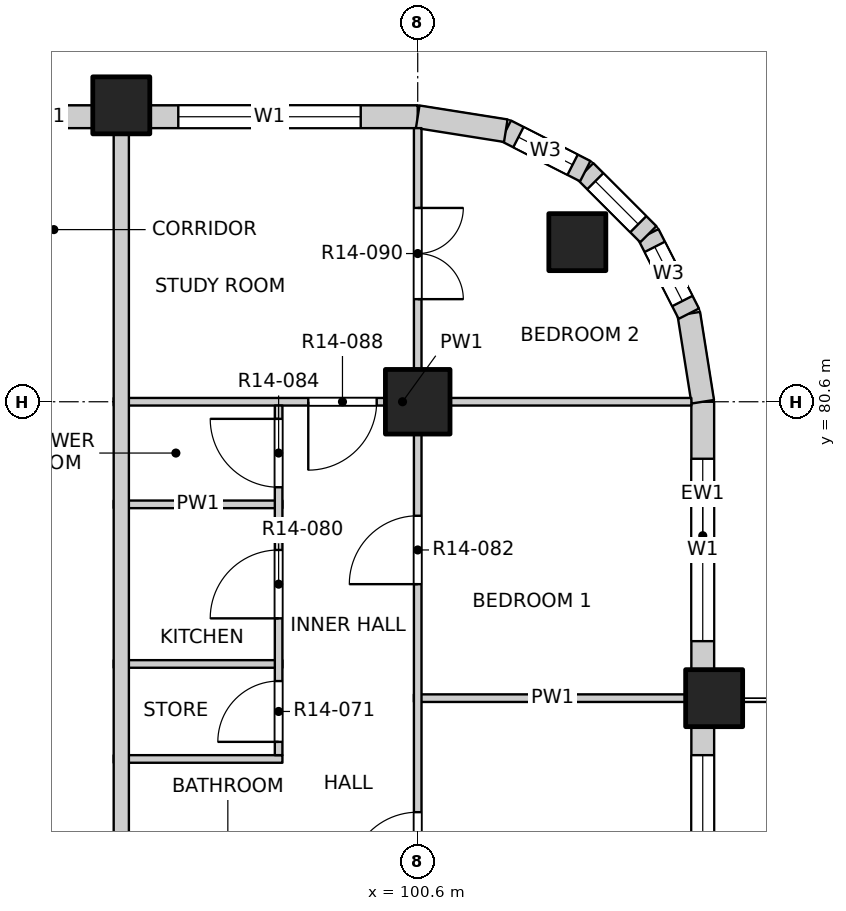
"""IFC4 building model, lengths in metres.
Left out: names, types, materials, properties, quantities, classifications, styles, units other than length and angle.
Written with IfcOpenShell. Run it as: python <this file> out.ifc"""

import sys

from ifc_helpers import new_model, si_unit, direction, frame, frame_2d, origin, origin_2d, place, context, subcontext, project, spatial, rectangle, extrude, element, fill, save


model = new_model("IFC4")
c1 = context("Model", 3, precision=1e-05, world=origin(), true_north=direction((0.0, 1.0)))
c2 = subcontext(c1, "Body", "Model", "MODEL_VIEW")
j1 = project(units=[si_unit("LENGTHUNIT", "METRE"), si_unit("PLANEANGLEUNIT", "RADIAN")], contexts=[c1])
p1 = place(None, origin())
s1 = spatial("IfcSite", under=j1, at=p1, CompositionType="ELEMENT")
p2 = place(p1, origin())
s2 = spatial("IfcBuilding", under=s1, at=p2, CompositionType="ELEMENT")
p3 = place(p2, frame((0.0, 0.0, 148.6)))
s3 = spatial("IfcBuildingStorey", under=s2, at=p3, CompositionType="ELEMENT", Elevation=148.6)
for number, where, z_axis, x_axis in (
    (1, (102.7, 82.7, -0.3), (0.0, 0.0, 1.0), (1.0, 0.0, 0.0)),
    (2, (104.5, 76.7, -0.3), (0.0, 0.0, 1.0), (1.0, 0.0, 0.0)),
    (3, (96.7, 84.5, -0.3), (0.0, 0.0, 1.0), (1.0, 0.0, 0.0)),
):
    element("IfcColumn", number, at=place(p3, frame(where, z_axis=z_axis, x_axis=x_axis)), inside=s3, PredefinedType="COLUMN", context=c2, shape_type="SweptSolid", body=[
        extrude(rectangle(XDim=0.75, YDim=0.75, at=origin_2d()), origin(), (0.0, 0.0, 1.0), 3.45),
    ])
p4 = place(p3, frame((100.6, 80.6, -0.3), z_axis=(0.0, 0.0, 1.0), x_axis=(1.0, 0.0, 0.0)))
e4 = element("IfcColumn", 4, at=p4, inside=s3, PredefinedType="COLUMN", context=c2, shape_type="SweptSolid", body=[
    extrude(rectangle(XDim=0.85, YDim=0.85, at=origin_2d()), origin(), (0.0, 0.0, 1.0), 3.45),
])
p5 = place(p3, frame((104.35, 69.275, 0.0), z_axis=(0.0, 0.0, 1.0), x_axis=(0.0, 1.0, 0.0)))
e5 = element("IfcWall", 5, at=p5, inside=s3, PredefinedType="SOLIDWALL", context=c2, shape_type="SweptSolid", body=[
    extrude(rectangle(XDim=7.05, YDim=0.3, at=frame_2d((3.525, 0.0))), origin(), (0.0, 0.0, 1.0), 2.7),
])
p6 = place(p5, frame((0.675, 0.0, 0.0)))
e6 = element("IfcOpeningElement", 6, at=p6, cuts=e5, PredefinedType="OPENING", context=c2, shape_type="SweptSolid", body=[
    extrude(rectangle(XDim=1.8, YDim=2.4, at=frame_2d((0.9, 1.2))), frame((0.0, 0.16, 0.0), z_axis=(0.0, -1.0, 0.0), x_axis=(1.0, 0.0, 0.0)), (0.0, 0.0, 1.0), 0.32),
])
p7 = place(p5, frame((4.275, 0.0, 0.9)))
e7 = element("IfcOpeningElement", 7, at=p7, cuts=e5, PredefinedType="OPENING", context=c2, shape_type="SweptSolid", body=[
    extrude(rectangle(XDim=2.4, YDim=1.8, at=frame_2d((1.2, 0.9))), frame((0.0, 0.16, 0.0), z_axis=(0.0, -1.0, 0.0), x_axis=(1.0, 0.0, 0.0)), (0.0, 0.0, 1.0), 0.32),
])
p8 = place(p3, frame((104.35, 77.075, 0.0), z_axis=(0.0, 0.0, 1.0), x_axis=(0.0, 1.0, 0.0)))
e8 = element("IfcWall", 8, at=p8, inside=s3, PredefinedType="SOLIDWALL", context=c2, shape_type="SweptSolid", body=[
    extrude(rectangle(XDim=3.525, YDim=0.3, at=frame_2d((1.763, 0.0))), origin(), (0.0, 0.0, 1.0), 2.7),
])
p9 = place(p8, frame((0.375, 0.0, 0.9)))
e9 = element("IfcOpeningElement", 9, at=p9, cuts=e8, PredefinedType="OPENING", context=c2, shape_type="SweptSolid", body=[
    extrude(rectangle(XDim=2.4, YDim=1.8, at=frame_2d((1.2, 0.9))), frame((0.0, 0.16, 0.0), z_axis=(0.0, -1.0, 0.0), x_axis=(1.0, 0.0, 0.0)), (0.0, 0.0, 1.0), 0.32),
])
p10 = place(p3, frame((95.025, 84.35, 0.0), z_axis=(0.0, 0.0, 1.0), x_axis=(1.0, 0.0, 0.0)))
e10 = element("IfcWall", 10, at=p10, inside=s3, PredefinedType="SOLIDWALL", context=c2, shape_type="SweptSolid", body=[
    extrude(rectangle(XDim=1.3, YDim=0.3, at=frame_2d((0.65, 0.0))), origin(), (0.0, 0.0, 1.0), 2.7),
])
p11 = place(p3, frame((97.075, 84.35, 0.0), z_axis=(0.0, 0.0, 1.0), x_axis=(1.0, 0.0, 0.0)))
e11 = element("IfcWall", 11, at=p11, inside=s3, PredefinedType="SOLIDWALL", context=c2, shape_type="SweptSolid", body=[
    extrude(rectangle(XDim=3.525, YDim=0.3, at=frame_2d((1.763, 0.0))), origin(), (0.0, 0.0, 1.0), 2.7),
])
p12 = place(p11, frame((0.375, 0.0, 0.9)))
e12 = element("IfcOpeningElement", 12, at=p12, cuts=e11, PredefinedType="OPENING", context=c2, shape_type="SweptSolid", body=[
    extrude(rectangle(XDim=2.4, YDim=1.8, at=frame_2d((1.2, 0.9))), frame((0.0, 0.16, 0.0), z_axis=(0.0, -1.0, 0.0), x_axis=(1.0, 0.0, 0.0)), (0.0, 0.0, 1.0), 0.32),
])
p13 = place(p3, frame((104.35, 80.6, 0.0), z_axis=(0.0, 0.0, 1.0), x_axis=(-0.156496880861, 0.987678452879, 0.0)))
e13 = element("IfcWall", 13, at=p13, inside=s3, PredefinedType="SOLIDWALL", context=c2, shape_type="SweptSolid", body=[
    extrude(rectangle(XDim=1.173, YDim=0.3, at=frame_2d((0.586, 0.0))), origin(), (0.0, 0.0, 1.0), 2.7),
])
p14 = place(p3, frame((104.167, 81.759, 0.0), z_axis=(0.0, 0.0, 1.0), x_axis=(-0.454025524128, 0.890988677504, 0.0)))
e14 = element("IfcWall", 14, at=p14, inside=s3, PredefinedType="SOLIDWALL", context=c2, shape_type="SweptSolid", body=[
    extrude(rectangle(XDim=1.173, YDim=0.3, at=frame_2d((0.587, 0.0))), origin(), (0.0, 0.0, 1.0), 2.7),
])
p15 = place(p14, frame((0.187, 0.0, 0.9)))
e15 = element("IfcOpeningElement", 15, at=p15, cuts=e14, PredefinedType="OPENING", context=c2, shape_type="SweptSolid", body=[
    extrude(rectangle(XDim=0.8, YDim=1.2, at=frame_2d((0.4, 0.6))), frame((0.0, 0.16, 0.0), z_axis=(0.0, -1.0, 0.0), x_axis=(1.0, 0.0, 0.0)), (0.0, 0.0, 1.0), 0.32),
])
p16 = place(p3, frame((103.634, 82.804, 0.0), z_axis=(0.0, 0.0, 1.0), x_axis=(-0.707106781187, 0.707106781187, 0.0)))
e16 = element("IfcWall", 16, at=p16, inside=s3, PredefinedType="SOLIDWALL", context=c2, shape_type="SweptSolid", body=[
    extrude(rectangle(XDim=1.173, YDim=0.3, at=frame_2d((0.586, 0.0))), origin(), (0.0, 0.0, 1.0), 2.7),
])
p17 = place(p16, frame((0.187, 0.0, 0.9)))
e17 = element("IfcOpeningElement", 17, at=p17, cuts=e16, PredefinedType="OPENING", context=c2, shape_type="SweptSolid", body=[
    extrude(rectangle(XDim=0.8, YDim=1.2, at=frame_2d((0.4, 0.6))), frame((0.0, 0.16, 0.0), z_axis=(0.0, -1.0, 0.0), x_axis=(1.0, 0.0, 0.0)), (0.0, 0.0, 1.0), 0.32),
])
p18 = place(p3, frame((102.804, 83.634, 0.0), z_axis=(0.0, 0.0, 1.0), x_axis=(-0.890988677504, 0.454025524128, 0.0)))
e18 = element("IfcWall", 18, at=p18, inside=s3, PredefinedType="SOLIDWALL", context=c2, shape_type="SweptSolid", body=[
    extrude(rectangle(XDim=1.173, YDim=0.3, at=frame_2d((0.587, 0.0))), origin(), (0.0, 0.0, 1.0), 2.7),
])
p19 = place(p18, frame((0.187, 0.0, 0.9)))
e19 = element("IfcOpeningElement", 19, at=p19, cuts=e18, PredefinedType="OPENING", context=c2, shape_type="SweptSolid", body=[
    extrude(rectangle(XDim=0.8, YDim=1.2, at=frame_2d((0.4, 0.6))), frame((0.0, 0.16, 0.0), z_axis=(0.0, -1.0, 0.0), x_axis=(1.0, 0.0, 0.0)), (0.0, 0.0, 1.0), 0.32),
])
p20 = place(p3, frame((101.759, 84.167, 0.0), z_axis=(0.0, 0.0, 1.0), x_axis=(-0.987678452879, 0.156496880861, 0.0)))
e20 = element("IfcWall", 20, at=p20, inside=s3, PredefinedType="SOLIDWALL", context=c2, shape_type="SweptSolid", body=[
    extrude(rectangle(XDim=1.173, YDim=0.3, at=frame_2d((0.586, 0.0))), origin(), (0.0, 0.0, 1.0), 2.7),
])
p21 = place(p3, frame((96.6, 75.9, 0.0), z_axis=(0.0, 0.0, 1.0), x_axis=(1.0, 0.0, 0.0)))
e21 = element("IfcWall", 21, at=p21, inside=s3, PredefinedType="PARTITIONING", context=c2, shape_type="SweptSolid", body=[
    extrude(rectangle(XDim=2.22, YDim=0.1, at=frame_2d((1.11, 0.0))), origin(), (0.0, 0.0, 1.0), 3.15),
])
p22 = place(p3, frame((100.55, 76.7, 0.0), z_axis=(0.0, 0.0, 1.0), x_axis=(1.0, 0.0, 0.0)))
e22 = element("IfcWall", 22, at=p22, inside=s3, PredefinedType="PARTITIONING", context=c2, shape_type="SweptSolid", body=[
    extrude(rectangle(XDim=3.65, YDim=0.1, at=frame_2d((1.825, 0.0))), origin(), (0.0, 0.0, 1.0), 2.55),
])
for number, where, z_axis, x_axis in (
    (23, (96.6, 77.15, 0.0), (0.0, 0.0, 1.0), (1.0, 0.0, 0.0)),
    (24, (96.6, 79.25, 0.0), (0.0, 0.0, 1.0), (1.0, 0.0, 0.0)),
):
    element("IfcWall", number, at=place(p3, frame(where, z_axis=z_axis, x_axis=x_axis)), inside=s3, PredefinedType="PARTITIONING", context=c2, shape_type="SweptSolid", body=[
        extrude(rectangle(XDim=2.22, YDim=0.1, at=frame_2d((1.11, 0.0))), origin(), (0.0, 0.0, 1.0), 3.15),
    ])
p23 = place(p3, frame((96.6, 80.6, 0.0), z_axis=(0.0, 0.0, 1.0), x_axis=(1.0, 0.0, 0.0)))
e25 = element("IfcWall", 25, at=p23, inside=s3, PredefinedType="PARTITIONING", context=c2, shape_type="SweptSolid", body=[
    extrude(rectangle(XDim=7.6, YDim=0.1, at=frame_2d((3.8, 0.0))), origin(), (0.0, 0.0, 1.0), 3.15),
])
p24 = place(p23, frame((2.56, 0.0, 0.0)))
e26 = element("IfcOpeningElement", 26, at=p24, cuts=e25, PredefinedType="OPENING", context=c2, shape_type="SweptSolid", body=[
    extrude(rectangle(XDim=0.9, YDim=2.1, at=frame_2d((0.45, 1.05))), frame((0.0, 0.06, 0.0), z_axis=(0.0, -1.0, 0.0), x_axis=(1.0, 0.0, 0.0)), (0.0, 0.0, 1.0), 0.12),
])
p25 = place(p3, frame((96.7, 49.5, 0.0), z_axis=(0.0, 0.0, 1.0), x_axis=(0.0, 1.0, 0.0)))
e27 = element("IfcWall", 27, at=p25, inside=s3, PredefinedType="PARTITIONING", context=c2, shape_type="SweptSolid", body=[
    extrude(rectangle(XDim=34.7, YDim=0.2, at=frame_2d((17.35, 0.0))), origin(), (0.0, 0.0, 1.0), 3.15),
])
p26 = place(p25, frame((3.225, 0.0, 0.0)))
e28 = element("IfcOpeningElement", 28, at=p26, cuts=e27, PredefinedType="OPENING", context=c2, shape_type="SweptSolid", body=[
    extrude(rectangle(XDim=1.0, YDim=2.1, at=frame_2d((0.5, 1.05))), frame((0.0, 0.11, 0.0), z_axis=(0.0, -1.0, 0.0), x_axis=(1.0, 0.0, 0.0)), (0.0, 0.0, 1.0), 0.22),
])
p27 = place(p25, frame((19.775, 0.0, 0.0)))
e29 = element("IfcOpeningElement", 29, at=p27, cuts=e27, PredefinedType="OPENING", context=c2, shape_type="SweptSolid", body=[
    extrude(rectangle(XDim=1.0, YDim=2.1, at=frame_2d((0.5, 1.05))), frame((0.0, 0.11, 0.0), z_axis=(0.0, -1.0, 0.0), x_axis=(1.0, 0.0, 0.0)), (0.0, 0.0, 1.0), 0.22),
])
p28 = place(p25, frame((24.125, 0.0, 0.0)))
e30 = element("IfcOpeningElement", 30, at=p28, cuts=e27, PredefinedType="OPENING", context=c2, shape_type="SweptSolid", body=[
    extrude(rectangle(XDim=1.0, YDim=2.1, at=frame_2d((0.5, 1.05))), frame((0.0, 0.11, 0.0), z_axis=(0.0, -1.0, 0.0), x_axis=(1.0, 0.0, 0.0)), (0.0, 0.0, 1.0), 0.22),
])
p29 = place(p3, frame((98.77, 75.95, 0.0), z_axis=(0.0, 0.0, 1.0), x_axis=(0.0, 1.0, 0.0)))
e31 = element("IfcWall", 31, at=p29, inside=s3, PredefinedType="PARTITIONING", context=c2, shape_type="SweptSolid", body=[
    extrude(rectangle(XDim=4.6, YDim=0.1, at=frame_2d((2.3, 0.0))), origin(), (0.0, 0.0, 1.0), 3.15),
])
p30 = place(p29, frame((0.175, 0.0, 0.0)))
e32 = element("IfcOpeningElement", 32, at=p30, cuts=e31, PredefinedType="OPENING", context=c2, shape_type="SweptSolid", body=[
    extrude(rectangle(XDim=0.8, YDim=2.1, at=frame_2d((0.4, 1.05))), frame((0.0, 0.06, 0.0), z_axis=(0.0, -1.0, 0.0), x_axis=(1.0, 0.0, 0.0)), (0.0, 0.0, 1.0), 0.12),
])
p31 = place(p29, frame((1.8, 0.0, 0.0)))
e33 = element("IfcOpeningElement", 33, at=p31, cuts=e31, PredefinedType="OPENING", context=c2, shape_type="SweptSolid", body=[
    extrude(rectangle(XDim=0.9, YDim=2.1, at=frame_2d((0.45, 1.05))), frame((0.0, 0.06, 0.0), z_axis=(0.0, -1.0, 0.0), x_axis=(1.0, 0.0, 0.0)), (0.0, 0.0, 1.0), 0.12),
])
p32 = place(p29, frame((3.525, 0.0, 0.0)))
e34 = element("IfcOpeningElement", 34, at=p32, cuts=e31, PredefinedType="OPENING", context=c2, shape_type="SweptSolid", body=[
    extrude(rectangle(XDim=0.9, YDim=2.1, at=frame_2d((0.45, 1.05))), frame((0.0, 0.06, 0.0), z_axis=(0.0, -1.0, 0.0), x_axis=(1.0, 0.0, 0.0)), (0.0, 0.0, 1.0), 0.12),
])
p33 = place(p3, frame((100.6, 45.8, 0.0), z_axis=(0.0, 0.0, 1.0), x_axis=(0.0, 1.0, 0.0)))
e35 = element("IfcWall", 35, at=p33, inside=s3, PredefinedType="PARTITIONING", context=c2, shape_type="SweptSolid", body=[
    extrude(rectangle(XDim=38.4, YDim=0.1, at=frame_2d((19.2, 0.0))), origin(), (0.0, 0.0, 1.0), 3.15),
])
p34 = place(p33, frame((1.05, 0.0, 0.0)))
e36 = element("IfcOpeningElement", 36, at=p34, cuts=e35, PredefinedType="OPENING", context=c2, shape_type="SweptSolid", body=[
    extrude(rectangle(XDim=1.2, YDim=2.1, at=frame_2d((0.6, 1.05))), frame((0.0, 0.06, 0.0), z_axis=(0.0, -1.0, 0.0), x_axis=(1.0, 0.0, 0.0)), (0.0, 0.0, 1.0), 0.12),
])
p35 = place(p33, frame((5.1, 0.0, 0.0)))
e37 = element("IfcOpeningElement", 37, at=p35, cuts=e35, PredefinedType="OPENING", context=c2, shape_type="SweptSolid", body=[
    extrude(rectangle(XDim=0.9, YDim=2.1, at=frame_2d((0.45, 1.05))), frame((0.0, 0.06, 0.0), z_axis=(0.0, -1.0, 0.0), x_axis=(1.0, 0.0, 0.0)), (0.0, 0.0, 1.0), 0.12),
])
p36 = place(p33, frame((9.0, 0.0, 0.0)))
e38 = element("IfcOpeningElement", 38, at=p36, cuts=e35, PredefinedType="OPENING", context=c2, shape_type="SweptSolid", body=[
    extrude(rectangle(XDim=0.9, YDim=2.1, at=frame_2d((0.45, 1.05))), frame((0.0, 0.06, 0.0), z_axis=(0.0, -1.0, 0.0), x_axis=(1.0, 0.0, 0.0)), (0.0, 0.0, 1.0), 0.12),
])
p37 = place(p33, frame((12.9, 0.0, 0.0)))
e39 = element("IfcOpeningElement", 39, at=p37, cuts=e35, PredefinedType="OPENING", context=c2, shape_type="SweptSolid", body=[
    extrude(rectangle(XDim=0.9, YDim=2.1, at=frame_2d((0.45, 1.05))), frame((0.0, 0.06, 0.0), z_axis=(0.0, -1.0, 0.0), x_axis=(1.0, 0.0, 0.0)), (0.0, 0.0, 1.0), 0.12),
])
p38 = place(p33, frame((16.8, 0.0, 0.0)))
e40 = element("IfcOpeningElement", 40, at=p38, cuts=e35, PredefinedType="OPENING", context=c2, shape_type="SweptSolid", body=[
    extrude(rectangle(XDim=0.9, YDim=2.1, at=frame_2d((0.45, 1.05))), frame((0.0, 0.06, 0.0), z_axis=(0.0, -1.0, 0.0), x_axis=(1.0, 0.0, 0.0)), (0.0, 0.0, 1.0), 0.12),
])
p39 = place(p33, frame((20.7, 0.0, 0.0)))
e41 = element("IfcOpeningElement", 41, at=p39, cuts=e35, PredefinedType="OPENING", context=c2, shape_type="SweptSolid", body=[
    extrude(rectangle(XDim=0.9, YDim=2.1, at=frame_2d((0.45, 1.05))), frame((0.0, 0.06, 0.0), z_axis=(0.0, -1.0, 0.0), x_axis=(1.0, 0.0, 0.0)), (0.0, 0.0, 1.0), 0.12),
])
p40 = place(p33, frame((24.6, 0.0, 0.0)))
e42 = element("IfcOpeningElement", 42, at=p40, cuts=e35, PredefinedType="OPENING", context=c2, shape_type="SweptSolid", body=[
    extrude(rectangle(XDim=0.9, YDim=2.1, at=frame_2d((0.45, 1.05))), frame((0.0, 0.06, 0.0), z_axis=(0.0, -1.0, 0.0), x_axis=(1.0, 0.0, 0.0)), (0.0, 0.0, 1.0), 0.12),
])
p41 = place(p33, frame((28.5, 0.0, 0.0)))
e43 = element("IfcOpeningElement", 43, at=p41, cuts=e35, PredefinedType="OPENING", context=c2, shape_type="SweptSolid", body=[
    extrude(rectangle(XDim=0.9, YDim=2.1, at=frame_2d((0.45, 1.05))), frame((0.0, 0.06, 0.0), z_axis=(0.0, -1.0, 0.0), x_axis=(1.0, 0.0, 0.0)), (0.0, 0.0, 1.0), 0.12),
])
p42 = place(p33, frame((32.4, 0.0, 0.0)))
e44 = element("IfcOpeningElement", 44, at=p42, cuts=e35, PredefinedType="OPENING", context=c2, shape_type="SweptSolid", body=[
    extrude(rectangle(XDim=0.9, YDim=2.1, at=frame_2d((0.45, 1.05))), frame((0.0, 0.06, 0.0), z_axis=(0.0, -1.0, 0.0), x_axis=(1.0, 0.0, 0.0)), (0.0, 0.0, 1.0), 0.12),
])
p43 = place(p33, frame((36.15, 0.0, 0.0)))
e45 = element("IfcOpeningElement", 45, at=p43, cuts=e35, PredefinedType="OPENING", context=c2, shape_type="SweptSolid", body=[
    extrude(rectangle(XDim=1.2, YDim=2.1, at=frame_2d((0.6, 1.05))), frame((0.0, 0.06, 0.0), z_axis=(0.0, -1.0, 0.0), x_axis=(1.0, 0.0, 0.0)), (0.0, 0.0, 1.0), 0.12),
])
p44 = place(p7, origin())
e46 = element("IfcWindow", 46, at=p44, inside=s3, PartitioningType="DOUBLE_PANEL_VERTICAL", PredefinedType="WINDOW", context=c2, shape_type="SweptSolid", body=[
    extrude(rectangle(XDim=2.4, YDim=1.8, at=frame_2d((1.2, 0.9))), frame((0.0, 0.03, 0.0), z_axis=(0.0, -1.0, 0.0), x_axis=(1.0, 0.0, 0.0)), (0.0, 0.0, 1.0), 0.06),
])
fill(e7, e46)
p45 = place(p9, origin())
e47 = element("IfcWindow", 47, at=p45, inside=s3, PartitioningType="DOUBLE_PANEL_VERTICAL", PredefinedType="WINDOW", context=c2, shape_type="SweptSolid", body=[
    extrude(rectangle(XDim=2.4, YDim=1.8, at=frame_2d((1.2, 0.9))), frame((0.0, 0.03, 0.0), z_axis=(0.0, -1.0, 0.0), x_axis=(1.0, 0.0, 0.0)), (0.0, 0.0, 1.0), 0.06),
])
fill(e9, e47)
p46 = place(p12, origin())
e48 = element("IfcWindow", 48, at=p46, inside=s3, PartitioningType="DOUBLE_PANEL_VERTICAL", PredefinedType="WINDOW", context=c2, shape_type="SweptSolid", body=[
    extrude(rectangle(XDim=2.4, YDim=1.8, at=frame_2d((1.2, 0.9))), frame((0.0, 0.03, 0.0), z_axis=(0.0, -1.0, 0.0), x_axis=(1.0, 0.0, 0.0)), (0.0, 0.0, 1.0), 0.06),
])
fill(e12, e48)
p47 = place(p15, origin())
e49 = element("IfcWindow", 49, at=p47, inside=s3, PartitioningType="SINGLE_PANEL", PredefinedType="WINDOW", context=c2, shape_type="SweptSolid", body=[
    extrude(rectangle(XDim=0.8, YDim=1.2, at=frame_2d((0.4, 0.6))), frame((0.0, 0.03, 0.0), z_axis=(0.0, -1.0, 0.0), x_axis=(1.0, 0.0, 0.0)), (0.0, 0.0, 1.0), 0.06),
])
fill(e15, e49)
p48 = place(p17, origin())
e50 = element("IfcWindow", 50, at=p48, inside=s3, PartitioningType="SINGLE_PANEL", PredefinedType="WINDOW", context=c2, shape_type="SweptSolid", body=[
    extrude(rectangle(XDim=0.8, YDim=1.2, at=frame_2d((0.4, 0.6))), frame((0.0, 0.03, 0.0), z_axis=(0.0, -1.0, 0.0), x_axis=(1.0, 0.0, 0.0)), (0.0, 0.0, 1.0), 0.06),
])
fill(e17, e50)
p49 = place(p19, origin())
e51 = element("IfcWindow", 51, at=p49, inside=s3, PartitioningType="SINGLE_PANEL", PredefinedType="WINDOW", context=c2, shape_type="SweptSolid", body=[
    extrude(rectangle(XDim=0.8, YDim=1.2, at=frame_2d((0.4, 0.6))), frame((0.0, 0.03, 0.0), z_axis=(0.0, -1.0, 0.0), x_axis=(1.0, 0.0, 0.0)), (0.0, 0.0, 1.0), 0.06),
])
fill(e19, e51)
p50 = place(p41, origin())
e52 = element("IfcDoor", 52, at=p50, inside=s3, OperationType="SINGLE_SWING_LEFT", PredefinedType="DOOR", context=c2, shape_type="SweptSolid", body=[
    extrude(rectangle(XDim=0.9, YDim=2.1, at=frame_2d((0.45, 1.05))), frame((0.0, 0.025, 0.0), z_axis=(0.0, -1.0, 0.0), x_axis=(1.0, 0.0, 0.0)), (0.0, 0.0, 1.0), 0.05),
])
fill(e43, e52)
p51 = place(p30, origin())
e53 = element("IfcDoor", 53, at=p51, inside=s3, OperationType="SINGLE_SWING_LEFT", PredefinedType="DOOR", context=c2, shape_type="SweptSolid", body=[
    extrude(rectangle(XDim=0.8, YDim=2.1, at=frame_2d((0.4, 1.05))), frame((0.0, 0.025, 0.0), z_axis=(0.0, -1.0, 0.0), x_axis=(1.0, 0.0, 0.0)), (0.0, 0.0, 1.0), 0.05),
])
fill(e32, e53)
p52 = place(p31, origin())
e54 = element("IfcDoor", 54, at=p52, inside=s3, OperationType="SINGLE_SWING_LEFT", PredefinedType="DOOR", context=c2, shape_type="SweptSolid", body=[
    extrude(rectangle(XDim=0.9, YDim=2.1, at=frame_2d((0.45, 1.05))), frame((0.0, 0.025, 0.0), z_axis=(0.0, -1.0, 0.0), x_axis=(1.0, 0.0, 0.0)), (0.0, 0.0, 1.0), 0.05),
])
fill(e33, e54)
p53 = place(p42, origin())
e55 = element("IfcDoor", 55, at=p53, inside=s3, OperationType="SINGLE_SWING_LEFT", PredefinedType="DOOR", context=c2, shape_type="SweptSolid", body=[
    extrude(rectangle(XDim=0.9, YDim=2.1, at=frame_2d((0.45, 1.05))), frame((0.0, 0.025, 0.0), z_axis=(0.0, -1.0, 0.0), x_axis=(1.0, 0.0, 0.0)), (0.0, 0.0, 1.0), 0.05),
])
fill(e44, e55)
p54 = place(p32, origin())
e56 = element("IfcDoor", 56, at=p54, inside=s3, OperationType="SINGLE_SWING_RIGHT", PredefinedType="DOOR", context=c2, shape_type="SweptSolid", body=[
    extrude(rectangle(XDim=0.9, YDim=2.1, at=frame_2d((0.45, 1.05))), frame((0.0, 0.025, 0.0), z_axis=(0.0, -1.0, 0.0), x_axis=(1.0, 0.0, 0.0)), (0.0, 0.0, 1.0), 0.05),
])
fill(e34, e56)
p55 = place(p24, origin())
e57 = element("IfcDoor", 57, at=p55, inside=s3, OperationType="SINGLE_SWING_RIGHT", PredefinedType="DOOR", context=c2, shape_type="SweptSolid", body=[
    extrude(rectangle(XDim=0.9, YDim=2.1, at=frame_2d((0.45, 1.05))), frame((0.0, 0.025, 0.0), z_axis=(0.0, -1.0, 0.0), x_axis=(1.0, 0.0, 0.0)), (0.0, 0.0, 1.0), 0.05),
])
fill(e26, e57)
p56 = place(p43, origin())
e58 = element("IfcDoor", 58, at=p56, inside=s3, OperationType="DOUBLE_DOOR_SINGLE_SWING", PredefinedType="DOOR", context=c2, shape_type="SweptSolid", body=[
    extrude(rectangle(XDim=1.2, YDim=2.1, at=frame_2d((0.6, 1.05))), frame((0.0, 0.025, 0.0), z_axis=(0.0, -1.0, 0.0), x_axis=(1.0, 0.0, 0.0)), (0.0, 0.0, 1.0), 0.05),
])
fill(e45, e58)
save(model, sys.argv[1])
